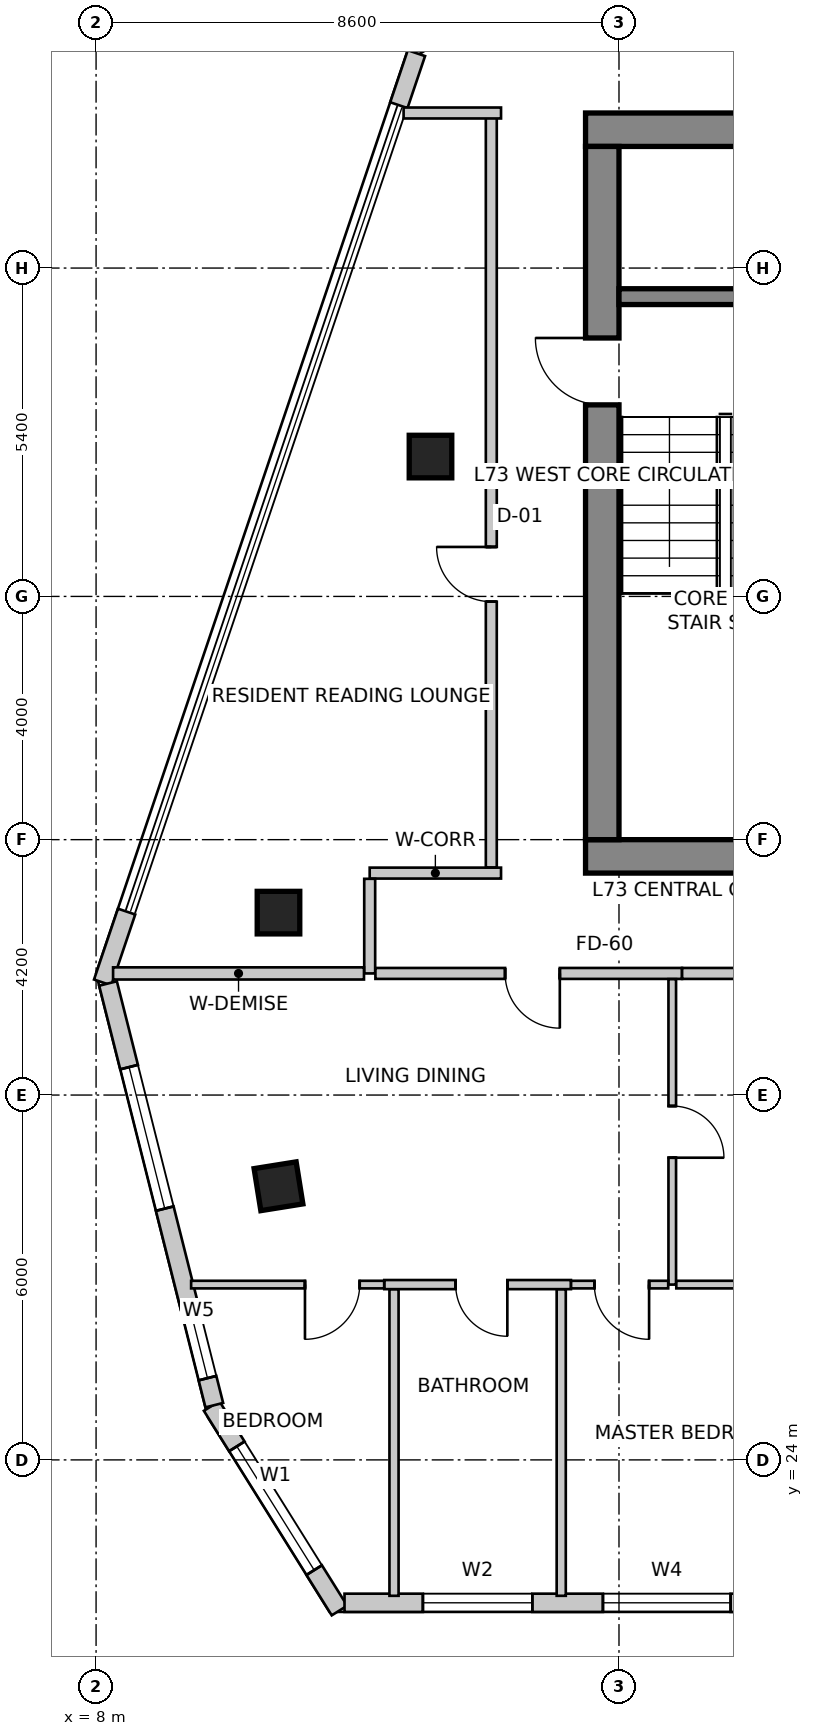
"""IFC4 building model, lengths in metres.
Left out: names, types, materials, properties, quantities, classifications, styles, units other than length and angle.
Written with IfcOpenShell. Run it as: python <this file> out.ifc"""

import sys

from ifc_helpers import new_model, si_unit, direction, frame, frame_2d, origin, origin_2d, place, context, subcontext, project, spatial, rectangle, extrude, source, transform, mapped, element, fill, save


model = new_model("IFC4")
c1 = context("Model", 3, precision=1e-05, world=origin(), true_north=direction((0.0, 1.0)))
c2 = subcontext(c1, "Body", "Model", "MODEL_VIEW")
j1 = project(units=[si_unit("LENGTHUNIT", "METRE"), si_unit("PLANEANGLEUNIT", "RADIAN")], contexts=[c1])
p1 = place(None, origin())
s1 = spatial("IfcSite", under=j1, at=p1, CompositionType="ELEMENT")
p2 = place(p1, origin())
s2 = spatial("IfcBuilding", under=s1, at=p2, CompositionType="ELEMENT")
p3 = place(p2, frame((0.0, 0.0, 285.3)))
s3 = spatial("IfcBuildingStorey", under=s2, at=p3, CompositionType="ELEMENT", Elevation=285.3)
p4 = place(p3, frame((16.05, 45.875, 0.0), z_axis=(0.0, 0.0, 1.0), x_axis=(1.0, 0.0, 0.0)))
e1 = element("IfcWall", 1, at=p4, inside=s3, PredefinedType="SHEAR", context=c2, shape_type="SweptSolid", body=[
    extrude(rectangle(XDim=15.5, YDim=0.55, at=frame_2d((7.75, 0.0))), origin(), (0.0, 0.0, 1.0), 3.6),
])
p5 = place(p3, frame((16.05, 33.925, 0.0), z_axis=(0.0, 0.0, 1.0), x_axis=(1.0, 0.0, 0.0)))
e2 = element("IfcWall", 2, at=p5, inside=s3, PredefinedType="SHEAR", context=c2, shape_type="SweptSolid", body=[
    extrude(rectangle(XDim=15.5, YDim=0.55, at=frame_2d((7.75, 0.0))), origin(), (0.0, 0.0, 1.0), 3.6),
])
m1 = source(origin(), c2, "Body", "SweptSolid", [
    extrude(rectangle(XDim=1.1, YDim=2.15, at=frame_2d((0.55, 1.075))), frame((0.0, 0.285, 0.0), z_axis=(0.0, -1.0, 0.0), x_axis=(1.0, 0.0, 0.0)), (0.0, 0.0, 1.0), 0.57),
])
p6 = place(p5, frame((9.98, 0.0, 0.0)))
e3 = element("IfcOpeningElement", 3, at=p6, cuts=e2, PredefinedType="OPENING", context=c2, shape_type="MappedRepresentation", body=[
    mapped(m1, transform((0.0, 0.0, 0.0), scale=1.0)),
])
p7 = place(p3, frame((16.325, 34.2, 0.0), z_axis=(0.0, 0.0, 1.0), x_axis=(0.0, 1.0, 0.0)))
e4 = element("IfcWall", 4, at=p7, inside=s3, PredefinedType="SHEAR", context=c2, shape_type="SweptSolid", body=[
    extrude(rectangle(XDim=11.4, YDim=0.55, at=frame_2d((5.7, 0.0))), origin(), (0.0, 0.0, 1.0), 3.6),
])
p8 = place(p7, frame((7.15, 0.0, 0.0)))
e5 = element("IfcOpeningElement", 5, at=p8, cuts=e4, PredefinedType="OPENING", context=c2, shape_type="MappedRepresentation", body=[
    mapped(m1, transform((0.0, 0.0, 0.0), scale=1.0)),
])
p9 = place(p3, frame((16.6, 43.13, 0.0), z_axis=(0.0, 0.0, 1.0), x_axis=(1.0, 0.0, 0.0)))
e6 = element("IfcWall", 6, at=p9, inside=s3, PredefinedType="SHEAR", context=c2, shape_type="SweptSolid", body=[
    extrude(rectangle(XDim=3.5, YDim=0.26, at=frame_2d((1.75, 0.0))), origin(), (0.0, 0.0, 1.0), 3.6),
])
m2 = source(origin(), c2, "Body", "SweptSolid", [
    extrude(rectangle(XDim=0.7, YDim=0.7, at=origin_2d()), origin(), (0.0, 0.0, 1.0), 3.6),
])
for number, where, z_axis, x_axis in (
    (7, (11.0, 33.0, 0.0), (0.0, 0.0, 1.0), (1.0, 0.0, 0.0)),
    (8, (13.5, 40.5, 0.0), (0.0, 0.0, 1.0), (1.0, 0.0, 0.0)),
    (9, (11.0, 28.5, 0.0), (0.0, 0.0, 1.0), (0.158, -0.987, 0.0)),
):
    element("IfcColumn", number, at=place(p3, frame(where, z_axis=z_axis, x_axis=x_axis)), inside=s3, PredefinedType="COLUMN", context=c2, shape_type="MappedRepresentation", body=[
        mapped(m2, transform((0.0, 0.0, 0.0), scale=1.0)),
    ])
p10 = place(p3, frame((9.9, 24.887, 0.0), z_axis=(0.0, 0.0, 1.0), x_axis=(0.530004471907, -0.84799484654, 0.0)))
e10 = element("IfcWall", 10, at=p10, inside=s3, PredefinedType="SOLIDWALL", context=c2, shape_type="SweptSolid", body=[
    extrude(rectangle(XDim=3.967, YDim=0.3, at=frame_2d((1.983, 0.0))), origin(), (0.0, 0.0, 1.0), 3.35),
])
m3 = source(origin(), c2, "Body", "SweptSolid", [
    extrude(rectangle(XDim=2.4, YDim=2.2, at=frame_2d((1.2, 1.1))), frame((0.0, 0.16, 0.0), z_axis=(0.0, -1.0, 0.0), x_axis=(1.0, 0.0, 0.0)), (0.0, 0.0, 1.0), 0.32),
])
p11 = place(p10, frame((0.783, 0.0, 0.85)))
e11 = element("IfcOpeningElement", 11, at=p11, cuts=e10, PredefinedType="OPENING", context=c2, shape_type="MappedRepresentation", body=[
    mapped(m3, transform((0.0, 0.0, 0.0), scale=1.0)),
])
p12 = place(p3, frame((12.086, 21.65, 0.0), z_axis=(0.0, 0.0, 1.0), x_axis=(1.0, 0.0, 0.0)))
e12 = element("IfcWall", 12, at=p12, inside=s3, PredefinedType="SOLIDWALL", context=c2, shape_type="SweptSolid", body=[
    extrude(rectangle(XDim=10.642, YDim=0.3, at=frame_2d((5.321, 0.0))), origin(), (0.0, 0.0, 1.0), 3.35),
])
m4 = source(origin(), c2, "Body", "SweptSolid", [
    extrude(rectangle(XDim=1.8, YDim=2.1, at=frame_2d((0.9, 1.05))), frame((0.0, 0.16, 0.0), z_axis=(0.0, -1.0, 0.0), x_axis=(1.0, 0.0, 0.0)), (0.0, 0.0, 1.0), 0.32),
])
p13 = place(p12, frame((1.289, 0.0, 0.85)))
e13 = element("IfcOpeningElement", 13, at=p13, cuts=e12, PredefinedType="OPENING", context=c2, shape_type="MappedRepresentation", body=[
    mapped(m4, transform((0.0, 0.0, 0.0), scale=1.0)),
])
m5 = source(origin(), c2, "Body", "SweptSolid", [
    extrude(rectangle(XDim=2.1, YDim=2.0, at=frame_2d((1.05, 1.0))), frame((0.0, 0.16, 0.0), z_axis=(0.0, -1.0, 0.0), x_axis=(1.0, 0.0, 0.0)), (0.0, 0.0, 1.0), 0.32),
])
p14 = place(p12, frame((4.25, 0.0, 0.85)))
e14 = element("IfcOpeningElement", 14, at=p14, cuts=e12, PredefinedType="OPENING", context=c2, shape_type="MappedRepresentation", body=[
    mapped(m5, transform((0.0, 0.0, 0.0), scale=1.0)),
])
p15 = place(p12, frame((7.722, 0.0, 0.85)))
e15 = element("IfcOpeningElement", 15, at=p15, cuts=e12, PredefinedType="OPENING", context=c2, shape_type="MappedRepresentation", body=[
    mapped(m5, transform((0.0, 0.0, 0.0), scale=1.0)),
])
p16 = place(p3, frame((21.873, 52.741, 0.0), z_axis=(0.0, 0.0, 1.0), x_axis=(-0.843661487732, -0.536875492193, 0.0)))
e16 = element("IfcWall", 16, at=p16, inside=s3, PredefinedType="SOLIDWALL", context=c2, shape_type="SweptSolid", body=[
    extrude(rectangle(XDim=10.282, YDim=0.3, at=frame_2d((5.141, 0.0))), origin(), (0.0, 0.0, 1.0), 3.35),
])
p17 = place(p16, frame((1.26, 0.0, 0.85)))
e17 = element("IfcOpeningElement", 17, at=p17, cuts=e16, PredefinedType="OPENING", context=c2, shape_type="MappedRepresentation", body=[
    mapped(m3, transform((0.0, 0.0, 0.0), scale=1.0)),
])
p18 = place(p16, frame((5.689, 0.0, 0.85)))
e18 = element("IfcOpeningElement", 18, at=p18, cuts=e16, PredefinedType="OPENING", context=c2, shape_type="MappedRepresentation", body=[
    mapped(m5, transform((0.0, 0.0, 0.0), scale=1.0)),
])
p19 = place(p3, frame((13.269, 47.134, 0.0), z_axis=(0.0, 0.0, 1.0), x_axis=(-0.31995770778, -0.947431826166, 0.0)))
e19 = element("IfcWall", 19, at=p19, inside=s3, PredefinedType="SOLIDWALL", context=c2, shape_type="SweptSolid", body=[
    extrude(rectangle(XDim=0.903, YDim=0.3, at=frame_2d((0.451, 0.0))), origin(), (0.0, 0.0, 1.0), 3.35),
])
p20 = place(p3, frame((8.502, 33.017, 0.0), z_axis=(0.0, 0.0, 1.0), x_axis=(-0.319798692732, -0.947485512357, 0.0)))
e20 = element("IfcWall", 20, at=p20, inside=s3, PredefinedType="SOLIDWALL", context=c2, shape_type="SweptSolid", body=[
    extrude(rectangle(XDim=1.23, YDim=0.3, at=frame_2d((0.615, 0.0))), origin(), (0.0, 0.0, 1.0), 3.35),
])
p21 = place(p3, frame((8.196, 31.835, 0.0), z_axis=(0.0, 0.0, 1.0), x_axis=(0.244430846523, -0.969666726906, 0.0)))
e21 = element("IfcWall", 21, at=p21, inside=s3, PredefinedType="SOLIDWALL", context=c2, shape_type="SweptSolid", body=[
    extrude(rectangle(XDim=7.152, YDim=0.3, at=frame_2d((3.576, 0.0))), origin(), (0.0, 0.0, 1.0), 3.35),
])
p22 = place(p21, frame((1.418, 0.0, 0.85)))
e22 = element("IfcOpeningElement", 22, at=p22, cuts=e21, PredefinedType="OPENING", context=c2, shape_type="MappedRepresentation", body=[
    mapped(m3, transform((0.0, 0.0, 0.0), scale=1.0)),
])
m6 = source(origin(), c2, "Body", "SweptSolid", [
    extrude(rectangle(XDim=1.2, YDim=1.6, at=frame_2d((0.6, 0.8))), frame((0.0, 0.16, 0.0), z_axis=(0.0, -1.0, 0.0), x_axis=(1.0, 0.0, 0.0)), (0.0, 0.0, 1.0), 0.32),
])
p23 = place(p21, frame((5.493, 0.0, 0.85)))
e23 = element("IfcOpeningElement", 23, at=p23, cuts=e21, PredefinedType="OPENING", context=c2, shape_type="MappedRepresentation", body=[
    mapped(m6, transform((0.0, 0.0, 0.0), scale=1.0)),
])
p24 = place(p3, frame((12.5, 33.65, 0.0), z_axis=(0.0, 0.0, 1.0), x_axis=(1.0, 0.0, 0.0)))
e24 = element("IfcWall", 24, at=p24, inside=s3, PredefinedType="PARTITIONING", context=c2, shape_type="SweptSolid", body=[
    extrude(rectangle(XDim=2.16, YDim=0.18, at=frame_2d((1.08, 0.0))), origin(), (0.0, 0.0, 1.0), 3.35),
])
p25 = place(p3, frame((12.5, 32.0, 0.0), z_axis=(0.0, 0.0, 1.0), x_axis=(0.0, 1.0, 0.0)))
e25 = element("IfcWall", 25, at=p25, inside=s3, PredefinedType="PARTITIONING", context=c2, shape_type="SweptSolid", body=[
    extrude(rectangle(XDim=1.556, YDim=0.18, at=frame_2d((0.778, 0.0))), origin(), (0.0, 0.0, 1.0), 3.019),
])
p26 = place(p3, frame((17.636, 32.0, 0.0), z_axis=(0.0, 0.0, 1.0), x_axis=(-1.0, 0.0, 0.0)))
e26 = element("IfcWall", 26, at=p26, inside=s3, PredefinedType="PARTITIONING", context=c2, shape_type="SweptSolid", body=[
    extrude(rectangle(XDim=5.042, YDim=0.18, at=frame_2d((2.521, 0.0))), origin(), (0.0, 0.0, 1.0), 3.019),
])
m7 = source(origin(), c2, "Body", "SweptSolid", [
    extrude(rectangle(XDim=0.9, YDim=2.15, at=frame_2d((0.45, 1.075))), frame((0.0, 0.1, 0.0), z_axis=(0.0, -1.0, 0.0), x_axis=(1.0, 0.0, 0.0)), (0.0, 0.0, 1.0), 0.2),
])
p27 = place(p26, frame((2.009, 0.0, 0.0)))
e27 = element("IfcOpeningElement", 27, at=p27, cuts=e26, PredefinedType="OPENING", context=c2, shape_type="MappedRepresentation", body=[
    mapped(m7, transform((0.0, 0.0, 0.0), scale=1.0)),
])
p28 = place(p3, frame((20.832, 32.0, 0.0), z_axis=(0.0, 0.0, 1.0), x_axis=(-1.0, 0.0, 0.0)))
e28 = element("IfcWall", 28, at=p28, inside=s3, PredefinedType="PARTITIONING", context=c2, shape_type="SweptSolid", body=[
    extrude(rectangle(XDim=3.194, YDim=0.18, at=frame_2d((1.597, 0.0))), origin(), (0.0, 0.0, 1.0), 3.35),
])
p29 = place(p3, frame((14.5, 33.744, 0.0), z_axis=(0.0, 0.0, 1.0), x_axis=(0.0, 1.0, 0.0)))
e29 = element("IfcWall", 29, at=p29, inside=s3, PredefinedType="PARTITIONING", context=c2, shape_type="SweptSolid", body=[
    extrude(rectangle(XDim=12.406, YDim=0.18, at=frame_2d((6.203, 0.0))), origin(), (0.0, 0.0, 1.0), 3.35),
])
p30 = place(p29, frame((4.37, 0.0, 0.0)))
e30 = element("IfcOpeningElement", 30, at=p30, cuts=e29, PredefinedType="OPENING", context=c2, shape_type="MappedRepresentation", body=[
    mapped(m7, transform((0.0, 0.0, 0.0), scale=1.0)),
])
p31 = place(p3, frame((14.66, 46.15, 0.0), z_axis=(0.0, 0.0, 1.0), x_axis=(-1.0, 0.0, 0.0)))
e31 = element("IfcWall", 31, at=p31, inside=s3, PredefinedType="PARTITIONING", context=c2, shape_type="SweptSolid", body=[
    extrude(rectangle(XDim=1.602, YDim=0.18, at=frame_2d((0.801, 0.0))), origin(), (0.0, 0.0, 1.0), 3.35),
])
p32 = place(p3, frame((12.406, 32.0, 0.0), z_axis=(0.0, 0.0, 1.0), x_axis=(-1.0, 0.0, 0.0)))
e32 = element("IfcWall", 32, at=p32, inside=s3, PredefinedType="PARTITIONING", context=c2, shape_type="SweptSolid", body=[
    extrude(rectangle(XDim=4.126, YDim=0.2, at=frame_2d((2.063, 0.0))), origin(), (0.0, 0.0, 1.0), 2.642),
])
p33 = place(p3, frame((17.476, 31.906, 0.0), z_axis=(0.0, 0.0, 1.0), x_axis=(0.0, -1.0, 0.0)))
e33 = element("IfcWall", 33, at=p33, inside=s3, PredefinedType="PARTITIONING", context=c2, shape_type="SweptSolid", body=[
    extrude(rectangle(XDim=5.023, YDim=0.125, at=frame_2d((2.511, 0.0))), origin(), (0.0, 0.0, 1.0), 2.979),
])
m8 = source(origin(), c2, "Body", "SweptSolid", [
    extrude(rectangle(XDim=0.85, YDim=2.15, at=frame_2d((0.425, 1.075))), frame((0.0, 0.073, 0.0), z_axis=(0.0, -1.0, 0.0), x_axis=(1.0, 0.0, 0.0)), (0.0, 0.0, 1.0), 0.145),
])
p34 = place(p33, frame((2.086, 0.0, 0.0)))
e34 = element("IfcOpeningElement", 34, at=p34, cuts=e33, PredefinedType="OPENING", context=c2, shape_type="MappedRepresentation", body=[
    mapped(m8, transform((0.0, 0.0, 0.0), scale=1.0)),
])
p35 = place(p3, frame((15.81, 26.883, 0.0), z_axis=(0.0, 0.0, 1.0), x_axis=(-1.0, 0.0, 0.0)))
e35 = element("IfcWall", 35, at=p35, inside=s3, PredefinedType="PARTITIONING", context=c2, shape_type="SweptSolid", body=[
    extrude(rectangle(XDim=3.07, YDim=0.15, at=frame_2d((1.535, 0.0))), origin(), (0.0, 0.0, 1.0), 3.019),
])
m9 = source(origin(), c2, "Body", "SweptSolid", [
    extrude(rectangle(XDim=0.85, YDim=2.15, at=frame_2d((0.425, 1.075))), frame((0.0, 0.085, 0.0), z_axis=(0.0, -1.0, 0.0), x_axis=(1.0, 0.0, 0.0)), (0.0, 0.0, 1.0), 0.17),
])
p36 = place(p35, frame((1.046, 0.0, 0.0)))
e36 = element("IfcOpeningElement", 36, at=p36, cuts=e35, PredefinedType="OPENING", context=c2, shape_type="MappedRepresentation", body=[
    mapped(m9, transform((0.0, 0.0, 0.0), scale=1.0)),
])
p37 = place(p3, frame((12.738, 26.883, 0.0), z_axis=(0.0, 0.0, 1.0), x_axis=(-1.0, 0.0, 0.0)))
e37 = element("IfcWall", 37, at=p37, inside=s3, PredefinedType="PARTITIONING", context=c2, shape_type="SweptSolid", body=[
    extrude(rectangle(XDim=3.175, YDim=0.125, at=frame_2d((1.587, 0.0))), origin(), (0.0, 0.0, 1.0), 3.35),
])
m10 = source(origin(), c2, "Body", "SweptSolid", [
    extrude(rectangle(XDim=0.9, YDim=2.15, at=frame_2d((0.45, 1.075))), frame((0.0, 0.073, 0.0), z_axis=(0.0, -1.0, 0.0), x_axis=(1.0, 0.0, 0.0)), (0.0, 0.0, 1.0), 0.145),
])
p38 = place(p37, frame((0.403, 0.0, 0.0)))
e38 = element("IfcOpeningElement", 38, at=p38, cuts=e37, PredefinedType="OPENING", context=c2, shape_type="MappedRepresentation", body=[
    mapped(m10, transform((0.0, 0.0, 0.0), scale=1.0)),
])
p39 = place(p3, frame((17.409, 26.883, 0.0), z_axis=(0.0, 0.0, 1.0), x_axis=(-1.0, 0.0, 0.0)))
e39 = element("IfcWall", 39, at=p39, inside=s3, PredefinedType="PARTITIONING", context=c2, shape_type="SweptSolid", body=[
    extrude(rectangle(XDim=1.597, YDim=0.125, at=frame_2d((0.799, 0.0))), origin(), (0.0, 0.0, 1.0), 3.019),
])
p40 = place(p39, frame((0.314, 0.0, 0.0)))
e40 = element("IfcOpeningElement", 40, at=p40, cuts=e39, PredefinedType="OPENING", context=c2, shape_type="MappedRepresentation", body=[
    mapped(m10, transform((0.0, 0.0, 0.0), scale=1.0)),
])
p41 = place(p3, frame((19.282, 26.883, 0.0), z_axis=(0.0, 0.0, 1.0), x_axis=(-1.0, 0.0, 0.0)))
e41 = element("IfcWall", 41, at=p41, inside=s3, PredefinedType="PARTITIONING", context=c2, shape_type="SweptSolid", body=[
    extrude(rectangle(XDim=1.74, YDim=0.125, at=frame_2d((0.87, 0.0))), origin(), (0.0, 0.0, 1.0), 3.35),
])
p42 = place(p3, frame((12.9, 21.765, 0.0), z_axis=(0.0, 0.0, 1.0), x_axis=(0.0, 1.0, 0.0)))
e42 = element("IfcWall", 42, at=p42, inside=s3, PredefinedType="PARTITIONING", context=c2, shape_type="SweptSolid", body=[
    extrude(rectangle(XDim=5.039, YDim=0.15, at=frame_2d((2.52, 0.0))), origin(), (0.0, 0.0, 1.0), 3.35),
])
p43 = place(p3, frame((15.65, 26.804, 0.0), z_axis=(0.0, 0.0, 1.0), x_axis=(0.0, -1.0, 0.0)))
e43 = element("IfcWall", 43, at=p43, inside=s3, PredefinedType="PARTITIONING", context=c2, shape_type="SweptSolid", body=[
    extrude(rectangle(XDim=5.039, YDim=0.15, at=frame_2d((2.52, 0.0))), origin(), (0.0, 0.0, 1.0), 3.019),
])
m11 = source(origin(), c2, "Body", "SweptSolid", [
    extrude(rectangle(XDim=2.4, YDim=2.2, at=frame_2d((1.2, 1.1))), frame((0.0, -0.015, 0.0), z_axis=(0.0, -1.0, 0.0), x_axis=(1.0, 0.0, 0.0)), (0.0, 0.0, 1.0), 0.06),
])
p44 = place(p11, origin())
e44 = element("IfcWindow", 44, at=p44, inside=s3, PartitioningType="SINGLE_PANEL", PredefinedType="WINDOW", context=c2, shape_type="MappedRepresentation", body=[
    mapped(m11, transform((0.0, 0.0, 0.0), scale=1.0)),
])
fill(e11, e44)
m12 = source(origin(), c2, "Body", "SweptSolid", [
    extrude(rectangle(XDim=1.8, YDim=2.1, at=frame_2d((0.9, 1.05))), frame((0.0, -0.015, 0.0), z_axis=(0.0, -1.0, 0.0), x_axis=(1.0, 0.0, 0.0)), (0.0, 0.0, 1.0), 0.06),
])
p45 = place(p13, origin())
e45 = element("IfcWindow", 45, at=p45, inside=s3, PartitioningType="SINGLE_PANEL", PredefinedType="WINDOW", context=c2, shape_type="MappedRepresentation", body=[
    mapped(m12, transform((0.0, 0.0, 0.0), scale=1.0)),
])
fill(e13, e45)
m13 = source(origin(), c2, "Body", "SweptSolid", [
    extrude(rectangle(XDim=2.1, YDim=2.0, at=frame_2d((1.05, 1.0))), frame((0.0, -0.015, 0.0), z_axis=(0.0, -1.0, 0.0), x_axis=(1.0, 0.0, 0.0)), (0.0, 0.0, 1.0), 0.06),
])
p46 = place(p14, origin())
e46 = element("IfcWindow", 46, at=p46, inside=s3, PartitioningType="SINGLE_PANEL", PredefinedType="WINDOW", context=c2, shape_type="MappedRepresentation", body=[
    mapped(m13, transform((0.0, 0.0, 0.0), scale=1.0)),
])
fill(e14, e46)
p47 = place(p22, origin())
e47 = element("IfcWindow", 47, at=p47, inside=s3, PartitioningType="SINGLE_PANEL", PredefinedType="WINDOW", context=c2, shape_type="MappedRepresentation", body=[
    mapped(m11, transform((0.0, 0.0, 0.0), scale=1.0)),
])
fill(e22, e47)
m14 = source(origin(), c2, "Body", "SweptSolid", [
    extrude(rectangle(XDim=1.2, YDim=1.6, at=frame_2d((0.6, 0.8))), frame((0.0, -0.015, 0.0), z_axis=(0.0, -1.0, 0.0), x_axis=(1.0, 0.0, 0.0)), (0.0, 0.0, 1.0), 0.06),
])
p48 = place(p23, origin())
e48 = element("IfcWindow", 48, at=p48, inside=s3, PartitioningType="SINGLE_PANEL", PredefinedType="WINDOW", context=c2, shape_type="MappedRepresentation", body=[
    mapped(m14, transform((0.0, 0.0, 0.0), scale=1.0)),
])
fill(e23, e48)
m15 = source(origin(), c2, "Body", "SweptSolid", [
    extrude(rectangle(XDim=1.1, YDim=2.15, at=frame_2d((0.55, 1.075))), frame((0.0, 0.025, 0.0), z_axis=(0.0, -1.0, 0.0), x_axis=(1.0, 0.0, 0.0)), (0.0, 0.0, 1.0), 0.05),
])
p49 = place(p8, origin())
e49 = element("IfcDoor", 49, at=p49, inside=s3, OperationType="SINGLE_SWING_RIGHT", PredefinedType="DOOR", context=c2, shape_type="MappedRepresentation", body=[
    mapped(m15, transform((0.0, 0.0, 0.0), scale=1.0)),
])
fill(e5, e49)
m16 = source(origin(), c2, "Body", "SweptSolid", [
    extrude(rectangle(XDim=0.9, YDim=2.15, at=frame_2d((0.45, 1.075))), frame((0.0, 0.025, 0.0), z_axis=(0.0, -1.0, 0.0), x_axis=(1.0, 0.0, 0.0)), (0.0, 0.0, 1.0), 0.05),
])
p50 = place(p30, origin())
e50 = element("IfcDoor", 50, at=p50, inside=s3, OperationType="SINGLE_SWING_RIGHT", PredefinedType="DOOR", context=c2, shape_type="MappedRepresentation", body=[
    mapped(m16, transform((0.0, 0.0, 0.0), scale=1.0)),
])
fill(e30, e50)
m17 = source(origin(), c2, "Body", "SweptSolid", [
    extrude(rectangle(XDim=0.9, YDim=2.15, at=frame_2d((0.45, 1.075))), frame((0.0, 0.025, 0.0), z_axis=(0.0, -1.0, 0.0), x_axis=(1.0, 0.0, 0.0)), (0.0, 0.0, 1.0), 0.05),
])
p51 = place(p27, origin())
e51 = element("IfcDoor", 51, at=p51, inside=s3, OperationType="SINGLE_SWING_LEFT", PredefinedType="DOOR", context=c2, shape_type="MappedRepresentation", body=[
    mapped(m17, transform((0.0, 0.0, 0.0), scale=1.0)),
])
fill(e27, e51)
m18 = source(origin(), c2, "Body", "SweptSolid", [
    extrude(rectangle(XDim=0.85, YDim=2.15, at=frame_2d((0.425, 1.075))), frame((0.0, 0.025, 0.0), z_axis=(0.0, -1.0, 0.0), x_axis=(1.0, 0.0, 0.0)), (0.0, 0.0, 1.0), 0.05),
])
p52 = place(p34, origin())
e52 = element("IfcDoor", 52, at=p52, inside=s3, OperationType="SINGLE_SWING_RIGHT", PredefinedType="DOOR", context=c2, shape_type="MappedRepresentation", body=[
    mapped(m18, transform((0.0, 0.0, 0.0), scale=1.0)),
])
fill(e34, e52)
p53 = place(p36, origin())
e53 = element("IfcDoor", 53, at=p53, inside=s3, OperationType="SINGLE_SWING_LEFT", PredefinedType="DOOR", context=c2, shape_type="MappedRepresentation", body=[
    mapped(m18, transform((0.0, 0.0, 0.0), scale=1.0)),
])
fill(e36, e53)
p54 = place(p38, origin())
e54 = element("IfcDoor", 54, at=p54, inside=s3, OperationType="SINGLE_SWING_RIGHT", PredefinedType="DOOR", context=c2, shape_type="MappedRepresentation", body=[
    mapped(m16, transform((0.0, 0.0, 0.0), scale=1.0)),
])
fill(e38, e54)
p55 = place(p40, origin())
e55 = element("IfcDoor", 55, at=p55, inside=s3, OperationType="SINGLE_SWING_LEFT", PredefinedType="DOOR", context=c2, shape_type="MappedRepresentation", body=[
    mapped(m16, transform((0.0, 0.0, 0.0), scale=1.0)),
])
fill(e40, e55)
save(model, sys.argv[1])
